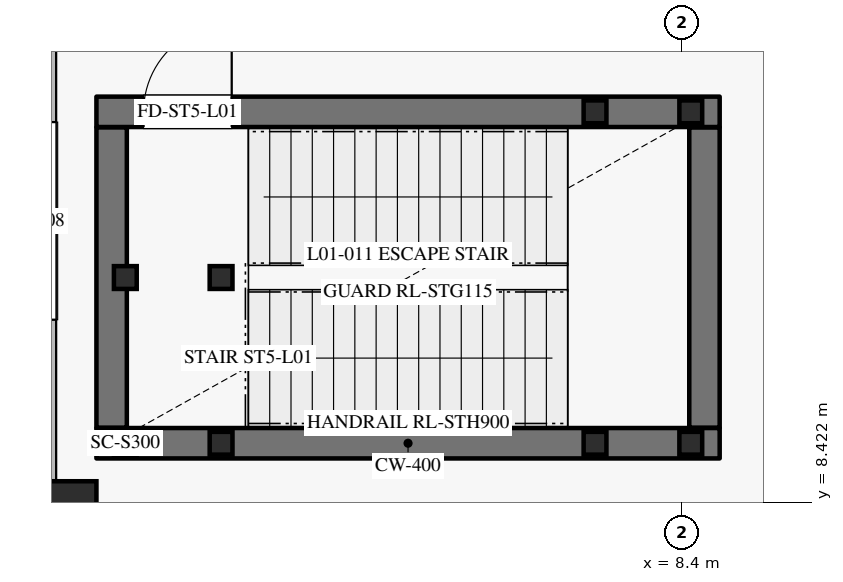
"""IFC4 building model, lengths in metres.
Left out: names, types, materials, properties, quantities, classifications, styles, units other than length and angle.
Written with IfcOpenShell. Run it as: python <this file> out.ifc"""

import sys

from ifc_helpers import new_model, si_unit, direction, frame, frame_2d, origin, origin_2d, place, context, subcontext, project, spatial, rectangle, hollow_rectangle, circle, extrude, element, fill, save


model = new_model("IFC4")
c1 = context("Model", 3, precision=1e-05, world=origin(), true_north=direction((0.0, 1.0)))
c2 = subcontext(c1, "Body", "Model", "MODEL_VIEW")
j1 = project(units=[si_unit("LENGTHUNIT", "METRE"), si_unit("PLANEANGLEUNIT", "RADIAN")], contexts=[c1])
p1 = place(None, origin())
s1 = spatial("IfcSite", under=j1, at=p1, CompositionType="ELEMENT")
p2 = place(p1, origin())
s2 = spatial("IfcBuilding", under=s1, at=p2, CompositionType="ELEMENT")
p3 = place(p2, frame((0.0, 0.0, 6.0)))
s3 = spatial("IfcBuildingStorey", under=s2, at=p3, CompositionType="ELEMENT", Elevation=6.0)
p4 = place(p3, frame((0.0, 8.0, 0.0), z_axis=(0.0, 0.0, 1.0), x_axis=(1.0, 0.0, 0.0)))
e1 = element("IfcColumn", 1, at=p4, inside=s3, PredefinedType="COLUMN", context=c2, shape_type="SweptSolid", body=[
    extrude(circle(Radius=0.7, at=origin_2d()), origin(), (0.0, 0.0, 1.0), 5.4),
])
p5 = place(p3, frame((0.0, 8.7, 0.0), z_axis=(0.0, 0.0, 1.0), x_axis=(0.0, 1.0, 0.0)))
e2 = element("IfcWall", 2, at=p5, inside=s3, PredefinedType="SOLIDWALL", context=c2, shape_type="SweptSolid", body=[
    extrude(rectangle(XDim=6.85, YDim=0.34, at=frame_2d((3.425, 0.0))), origin(), (0.0, 0.0, 1.0), 4.67),
])
p6 = place(p5, frame((2.125, 0.0, 1.4)))
e3 = element("IfcOpeningElement", 3, at=p6, cuts=e2, PredefinedType="OPENING", context=c2, shape_type="SweptSolid", body=[
    extrude(rectangle(XDim=2.6, YDim=1.85, at=frame_2d((1.3, 0.925))), frame((0.0, 0.18, 0.0), z_axis=(0.0, -1.0, 0.0), x_axis=(1.0, 0.0, 0.0)), (0.0, 0.0, 1.0), 0.36),
])
p7 = place(p3, frame((0.7, 9.2, 0.0), z_axis=(0.0, 0.0, 1.0), x_axis=(1.0, 0.0, 0.0)))
e4 = element("IfcWall", 4, at=p7, inside=s3, PredefinedType="SHEAR", context=c2, shape_type="SweptSolid", body=[
    extrude(rectangle(XDim=8.2, YDim=0.4, at=frame_2d((4.1, 0.0))), origin(), (0.0, 0.0, 1.0), 5.045),
])
p8 = place(p3, frame((8.7, 9.405, 0.0), z_axis=(0.0, 0.0, 1.0), x_axis=(0.0, 1.0, 0.0)))
e5 = element("IfcWall", 5, at=p8, inside=s3, PredefinedType="SHEAR", context=c2, shape_type="SweptSolid", body=[
    extrude(rectangle(XDim=3.95, YDim=0.4, at=frame_2d((1.975, 0.0))), origin(), (0.0, 0.0, 1.0), 5.045),
])
p9 = place(p3, frame((0.7, 13.56, 0.0), z_axis=(0.0, 0.0, 1.0), x_axis=(1.0, 0.0, 0.0)))
e6 = element("IfcWall", 6, at=p9, inside=s3, PredefinedType="SHEAR", context=c2, shape_type="SweptSolid", body=[
    extrude(rectangle(XDim=8.2, YDim=0.4, at=frame_2d((4.1, 0.0))), origin(), (0.0, 0.0, 1.0), 5.045),
])
p10 = place(p9, frame((0.62, 0.0, 0.0)))
e7 = element("IfcOpeningElement", 7, at=p10, cuts=e6, PredefinedType="OPENING", context=c2, shape_type="SweptSolid", body=[
    extrude(rectangle(XDim=1.16, YDim=2.2, at=frame_2d((0.58, 1.1))), frame((0.0, 0.21, 0.0), z_axis=(0.0, -1.0, 0.0), x_axis=(1.0, 0.0, 0.0)), (0.0, 0.0, 1.0), 0.42),
])
p11 = place(p3, frame((0.9, 9.405, 0.0), z_axis=(0.0, 0.0, 1.0), x_axis=(0.0, 1.0, 0.0)))
e8 = element("IfcWall", 8, at=p11, inside=s3, PredefinedType="SHEAR", context=c2, shape_type="SweptSolid", body=[
    extrude(rectangle(XDim=3.95, YDim=0.4, at=frame_2d((1.975, 0.0))), origin(), (0.0, 0.0, 1.0), 5.045),
])
for number, where, z_axis, x_axis in (
    (9, (1.08, 9.2, 0.0), (0.0, 0.0, 1.0), (1.0, 0.0, 0.0)),
    (10, (1.08, 11.38, 0.0), (0.0, 0.0, 1.0), (1.0, 0.0, 0.0)),
    (11, (2.34, 9.2, 0.0), (0.0, 0.0, 1.0), (1.0, 0.0, 0.0)),
    (12, (2.34, 11.38, 0.0), (0.0, 0.0, 1.0), (1.0, 0.0, 0.0)),
):
    element("IfcColumn", number, at=place(p3, frame(where, z_axis=z_axis, x_axis=x_axis)), inside=s3, PredefinedType="COLUMN", context=c2, shape_type="SweptSolid", body=[
        extrude(hollow_rectangle(XDim=0.3, YDim=0.3, WallThickness=0.012, at=origin_2d()), origin(), (0.0, 0.0, 1.0), 5.22),
    ])
for number, where, z_axis, x_axis in (
    (13, (7.26, 9.2, -3.0), (0.0, 0.0, 1.0), (1.0, 0.0, 0.0)),
    (14, (7.26, 13.56, -3.0), (0.0, 0.0, 1.0), (1.0, 0.0, 0.0)),
    (15, (8.52, 9.2, -3.0), (0.0, 0.0, 1.0), (1.0, 0.0, 0.0)),
    (16, (8.52, 13.56, -3.0), (0.0, 0.0, 1.0), (1.0, 0.0, 0.0)),
):
    element("IfcColumn", number, at=place(p3, frame(where, z_axis=z_axis, x_axis=x_axis)), inside=s3, PredefinedType="COLUMN", context=c2, shape_type="SweptSolid", body=[
        extrude(hollow_rectangle(XDim=0.3, YDim=0.3, WallThickness=0.012, at=origin_2d()), origin(), (0.0, 0.0, 1.0), 5.52),
    ])
p12 = place(p10, origin())
e17 = element("IfcDoor", 17, at=p12, inside=s3, OperationType="SINGLE_SWING_RIGHT", PredefinedType="DOOR", context=c2, shape_type="SweptSolid", body=[
    extrude(rectangle(XDim=1.16, YDim=2.2, at=frame_2d((0.58, 1.1))), frame((0.0, 0.025, 0.0), z_axis=(0.0, -1.0, 0.0), x_axis=(1.0, 0.0, 0.0)), (0.0, 0.0, 1.0), 0.05),
])
fill(e7, e17)
save(model, sys.argv[1])
